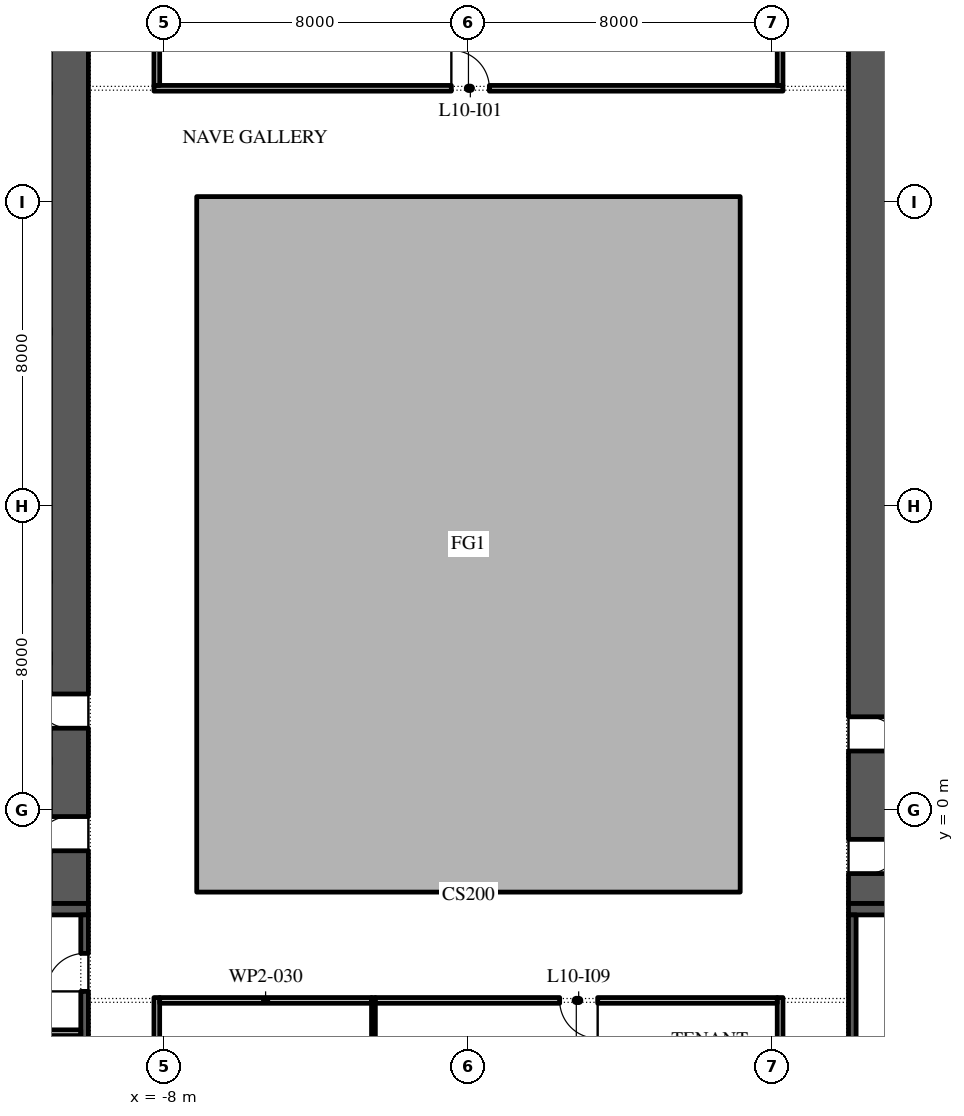
"""IFC4 building model, lengths in metres.
Left out: names, types, materials, properties, quantities, classifications, styles, units other than length and angle.
Written with IfcOpenShell. Run it as: python <this file> out.ifc"""

import sys

from ifc_helpers import new_model, si_unit, direction, frame, frame_2d, origin, place, context, subcontext, project, spatial, polyline, rectangle, outline, extrude, element, fill, save


model = new_model("IFC4")
c1 = context("Model", 3, precision=1e-05, world=origin(), true_north=direction((0.0, 1.0)))
c2 = subcontext(c1, "Body", "Model", "MODEL_VIEW")
j1 = project(units=[si_unit("LENGTHUNIT", "METRE"), si_unit("PLANEANGLEUNIT", "RADIAN")], contexts=[c1])
p1 = place(None, origin())
s1 = spatial("IfcSite", under=j1, at=p1, CompositionType="ELEMENT")
p2 = place(p1, origin())
s2 = spatial("IfcBuilding", under=s1, at=p2, CompositionType="ELEMENT")
p3 = place(p2, frame((0.0, 0.0, 52.2)))
s3 = spatial("IfcBuildingStorey", under=s2, at=p3, CompositionType="ELEMENT", Elevation=52.2)
p4 = place(p3, origin())
e1 = element("IfcWall", 1, at=p4, inside=s3, PredefinedType="STANDARD", context=c2, shape_type="SweptSolid", body=[
    extrude(outline(polyline([(-7.15, -2.15), (7.15, -2.15), (7.15, 16.15), (-7.15, 16.15), (-7.15, -2.15)]), holes=[polyline([(-7.0, -2.0), (-7.0, 16.0), (7.0, 16.0), (7.0, -2.0), (-7.0, -2.0)])]), origin(), (0.0, 0.0, 1.0), 4.0),
])
p5 = place(p3, frame((-10.5, -2.45, 0.0), z_axis=(0.0, 0.0, 1.0), x_axis=(0.0, 1.0, 0.0)))
e2 = element("IfcWall", 2, at=p5, inside=s3, PredefinedType="SHEAR", context=c2, shape_type="SweptSolid", body=[
    extrude(rectangle(XDim=27.9, YDim=1.0, at=frame_2d((13.95, 0.0))), origin(), (0.0, 0.0, 1.0), 4.0),
])
p6 = place(p5, frame((23.65, 0.0, 0.0)))
e3 = element("IfcOpeningElement", 3, at=p6, cuts=e2, PredefinedType="OPENING", context=c2, shape_type="SweptSolid", body=[
    extrude(rectangle(XDim=2.4, YDim=2.1, at=frame_2d((1.2, 1.05))), frame((0.0, 0.51, 0.0), z_axis=(0.0, -1.0, 0.0), x_axis=(1.0, 0.0, 0.0)), (0.0, 0.0, 1.0), 1.02),
])
p7 = place(p5, frame((1.387, 0.0, 0.0)))
e4 = element("IfcOpeningElement", 4, at=p7, cuts=e2, PredefinedType="OPENING", context=c2, shape_type="SweptSolid", body=[
    extrude(rectangle(XDim=0.9, YDim=2.1, at=frame_2d((0.45, 1.05))), frame((0.0, 0.51, 0.0), z_axis=(0.0, -1.0, 0.0), x_axis=(1.0, 0.0, 0.0)), (0.0, 0.0, 1.0), 1.02),
])
p8 = place(p5, frame((4.613, 0.0, 0.0)))
e5 = element("IfcOpeningElement", 5, at=p8, cuts=e2, PredefinedType="OPENING", context=c2, shape_type="SweptSolid", body=[
    extrude(rectangle(XDim=0.9, YDim=2.1, at=frame_2d((0.45, 1.05))), frame((0.0, 0.51, 0.0), z_axis=(0.0, -1.0, 0.0), x_axis=(1.0, 0.0, 0.0)), (0.0, 0.0, 1.0), 1.02),
])
p9 = place(p3, frame((-22.0, -2.6, 0.0), z_axis=(0.0, 0.0, 1.0), x_axis=(1.0, 0.0, 0.0)))
e6 = element("IfcWall", 6, at=p9, inside=s3, PredefinedType="SHEAR", context=c2, shape_type="SweptSolid", body=[
    extrude(rectangle(XDim=12.0, YDim=0.3, at=frame_2d((6.0, 0.0))), origin(), (0.0, 0.0, 1.0), 4.0),
])
p10 = place(p3, frame((-10.1, -15.8, 0.0), z_axis=(0.0, 0.0, 1.0), x_axis=(0.0, 1.0, 0.0)))
e7 = element("IfcWall", 7, at=p10, inside=s3, PredefinedType="SHEAR", context=c2, shape_type="SweptSolid", body=[
    extrude(rectangle(XDim=13.05, YDim=0.2, at=frame_2d((6.525, 0.0))), origin(), (0.0, 0.0, 1.0), 4.0),
])
p11 = place(p10, frame((4.488, 0.0, 0.0)))
e8 = element("IfcOpeningElement", 8, at=p11, cuts=e7, PredefinedType="OPENING", context=c2, shape_type="SweptSolid", body=[
    extrude(rectangle(XDim=0.9, YDim=2.1, at=frame_2d((0.45, 1.05))), frame((0.0, 0.11, 0.0), z_axis=(0.0, -1.0, 0.0), x_axis=(1.0, 0.0, 0.0)), (0.0, 0.0, 1.0), 0.22),
])
p12 = place(p10, frame((11.038, 0.0, 0.0)))
e9 = element("IfcOpeningElement", 9, at=p12, cuts=e7, PredefinedType="OPENING", context=c2, shape_type="SweptSolid", body=[
    extrude(rectangle(XDim=1.0, YDim=2.1, at=frame_2d((0.5, 1.05))), frame((0.0, 0.11, 0.0), z_axis=(0.0, -1.0, 0.0), x_axis=(1.0, 0.0, 0.0)), (0.0, 0.0, 1.0), 0.22),
])
p13 = place(p3, frame((-21.8, -5.85, 0.0), z_axis=(0.0, 0.0, 1.0), x_axis=(1.0, 0.0, 0.0)))
e10 = element("IfcWall", 10, at=p13, inside=s3, PredefinedType="PARTITIONING", context=c2, shape_type="SweptSolid", body=[
    extrude(rectangle(XDim=11.6, YDim=0.15, at=frame_2d((5.8, 0.0))), origin(), (0.0, 0.0, 1.0), 4.0),
])
p14 = place(p3, frame((10.5, -2.45, 0.0), z_axis=(0.0, 0.0, 1.0), x_axis=(0.0, 1.0, 0.0)))
e11 = element("IfcWall", 11, at=p14, inside=s3, PredefinedType="SHEAR", context=c2, shape_type="SweptSolid", body=[
    extrude(rectangle(XDim=27.9, YDim=1.0, at=frame_2d((13.95, 0.0))), origin(), (0.0, 0.0, 1.0), 4.0),
])
p15 = place(p14, frame((23.65, 0.0, 0.0)))
e12 = element("IfcOpeningElement", 12, at=p15, cuts=e11, PredefinedType="OPENING", context=c2, shape_type="SweptSolid", body=[
    extrude(rectangle(XDim=2.4, YDim=2.1, at=frame_2d((1.2, 1.05))), frame((0.0, 0.51, 0.0), z_axis=(0.0, -1.0, 0.0), x_axis=(1.0, 0.0, 0.0)), (0.0, 0.0, 1.0), 1.02),
])
p16 = place(p14, frame((0.788, 0.0, 0.0)))
e13 = element("IfcOpeningElement", 13, at=p16, cuts=e11, PredefinedType="OPENING", context=c2, shape_type="SweptSolid", body=[
    extrude(rectangle(XDim=0.9, YDim=2.1, at=frame_2d((0.45, 1.05))), frame((0.0, 0.51, 0.0), z_axis=(0.0, -1.0, 0.0), x_axis=(1.0, 0.0, 0.0)), (0.0, 0.0, 1.0), 1.02),
])
p17 = place(p14, frame((4.012, 0.0, 0.0)))
e14 = element("IfcOpeningElement", 14, at=p17, cuts=e11, PredefinedType="OPENING", context=c2, shape_type="SweptSolid", body=[
    extrude(rectangle(XDim=0.9, YDim=2.1, at=frame_2d((0.45, 1.05))), frame((0.0, 0.51, 0.0), z_axis=(0.0, -1.0, 0.0), x_axis=(1.0, 0.0, 0.0)), (0.0, 0.0, 1.0), 1.02),
])
p18 = place(p3, frame((10.0, -2.6, 0.0), z_axis=(0.0, 0.0, 1.0), x_axis=(1.0, 0.0, 0.0)))
e15 = element("IfcWall", 15, at=p18, inside=s3, PredefinedType="SHEAR", context=c2, shape_type="SweptSolid", body=[
    extrude(rectangle(XDim=12.0, YDim=0.3, at=frame_2d((6.0, 0.0))), origin(), (0.0, 0.0, 1.0), 4.0),
])
p19 = place(p3, frame((10.1, -15.8, 0.0), z_axis=(0.0, 0.0, 1.0), x_axis=(0.0, 1.0, 0.0)))
e16 = element("IfcWall", 16, at=p19, inside=s3, PredefinedType="SHEAR", context=c2, shape_type="SweptSolid", body=[
    extrude(rectangle(XDim=13.05, YDim=0.2, at=frame_2d((6.525, 0.0))), origin(), (0.0, 0.0, 1.0), 4.0),
])
p20 = place(p19, frame((6.075, 0.0, 0.0)))
e17 = element("IfcOpeningElement", 17, at=p20, cuts=e16, PredefinedType="OPENING", context=c2, shape_type="SweptSolid", body=[
    extrude(rectangle(XDim=0.9, YDim=2.1, at=frame_2d((0.45, 1.05))), frame((0.0, 0.11, 0.0), z_axis=(0.0, -1.0, 0.0), x_axis=(1.0, 0.0, 0.0)), (0.0, 0.0, 1.0), 0.22),
])
p21 = place(p3, frame((-8.2, -4.925, 0.0), z_axis=(0.0, 0.0, 1.0), x_axis=(0.0, -1.0, 0.0)))
e18 = element("IfcWall", 18, at=p21, inside=s3, PredefinedType="PARTITIONING", context=c2, shape_type="SweptSolid", body=[
    extrude(rectangle(XDim=12.415, YDim=0.15, at=frame_2d((6.208, 0.0))), origin(), (0.0, 0.0, 1.0), 4.0),
])
p22 = place(p21, frame((5.715, 0.0, 0.0)))
e19 = element("IfcOpeningElement", 19, at=p22, cuts=e18, PredefinedType="OPENING", context=c2, shape_type="SweptSolid", body=[
    extrude(rectangle(XDim=1.0, YDim=2.1, at=frame_2d((0.5, 1.05))), frame((0.0, 0.085, 0.0), z_axis=(0.0, -1.0, 0.0), x_axis=(1.0, 0.0, 0.0)), (0.0, 0.0, 1.0), 0.17),
])
p23 = place(p3, frame((-8.275, 19.0, 0.0), z_axis=(0.0, 0.0, 1.0), x_axis=(1.0, 0.0, 0.0)))
e20 = element("IfcWall", 20, at=p23, inside=s3, PredefinedType="PARTITIONING", context=c2, shape_type="SweptSolid", body=[
    extrude(rectangle(XDim=16.55, YDim=0.15, at=frame_2d((8.275, 0.0))), origin(), (0.0, 0.0, 1.0), 4.0),
])
p24 = place(p23, frame((7.825, 0.0, 0.0)))
e21 = element("IfcOpeningElement", 21, at=p24, cuts=e20, PredefinedType="OPENING", context=c2, shape_type="SweptSolid", body=[
    extrude(rectangle(XDim=1.0, YDim=2.1, at=frame_2d((0.5, 1.05))), frame((0.0, 0.085, 0.0), z_axis=(0.0, -1.0, 0.0), x_axis=(1.0, 0.0, 0.0)), (0.0, 0.0, 1.0), 0.17),
])
p25 = place(p3, frame((-8.2, 25.45, 0.0), z_axis=(0.0, 0.0, 1.0), x_axis=(0.0, -1.0, 0.0)))
e22 = element("IfcWall", 22, at=p25, inside=s3, PredefinedType="PARTITIONING", context=c2, shape_type="SweptSolid", body=[
    extrude(rectangle(XDim=6.375, YDim=0.15, at=frame_2d((3.188, 0.0))), origin(), (0.0, 0.0, 1.0), 4.0),
])
p26 = place(p3, frame((-2.5, -8.45, 0.0), z_axis=(0.0, 0.0, 1.0), x_axis=(0.0, 1.0, 0.0)))
e23 = element("IfcWall", 23, at=p26, inside=s3, PredefinedType="PARTITIONING", context=c2, shape_type="SweptSolid", body=[
    extrude(rectangle(XDim=3.525, YDim=0.1, at=frame_2d((1.762, 0.0))), origin(), (0.0, 0.0, 1.0), 4.0),
])
p27 = place(p3, frame((-2.55, -5.0, 0.0), z_axis=(0.0, 0.0, 1.0), x_axis=(-1.0, 0.0, 0.0)))
e24 = element("IfcWall", 24, at=p27, inside=s3, PredefinedType="PARTITIONING", context=c2, shape_type="SweptSolid", body=[
    extrude(rectangle(XDim=5.575, YDim=0.15, at=frame_2d((2.788, 0.0))), origin(), (0.0, 0.0, 1.0), 4.0),
])
p28 = place(p3, frame((8.2, -8.45, 0.0), z_axis=(0.0, 0.0, 1.0), x_axis=(0.0, 1.0, 0.0)))
e25 = element("IfcWall", 25, at=p28, inside=s3, PredefinedType="PARTITIONING", context=c2, shape_type="SweptSolid", body=[
    extrude(rectangle(XDim=3.525, YDim=0.15, at=frame_2d((1.762, 0.0))), origin(), (0.0, 0.0, 1.0), 4.0),
])
p29 = place(p3, frame((8.125, -5.0, 0.0), z_axis=(0.0, 0.0, 1.0), x_axis=(-1.0, 0.0, 0.0)))
e26 = element("IfcWall", 26, at=p29, inside=s3, PredefinedType="PARTITIONING", context=c2, shape_type="SweptSolid", body=[
    extrude(rectangle(XDim=10.575, YDim=0.15, at=frame_2d((5.288, 0.0))), origin(), (0.0, 0.0, 1.0), 4.0),
])
p30 = place(p29, frame((4.725, 0.0, 0.0)))
e27 = element("IfcOpeningElement", 27, at=p30, cuts=e26, PredefinedType="OPENING", context=c2, shape_type="SweptSolid", body=[
    extrude(rectangle(XDim=1.0, YDim=2.1, at=frame_2d((0.5, 1.05))), frame((0.0, 0.085, 0.0), z_axis=(0.0, -1.0, 0.0), x_axis=(1.0, 0.0, 0.0)), (0.0, 0.0, 1.0), 0.17),
])
p31 = place(p3, frame((8.2, 19.075, 0.0), z_axis=(0.0, 0.0, 1.0), x_axis=(0.0, 1.0, 0.0)))
e28 = element("IfcWall", 28, at=p31, inside=s3, PredefinedType="PARTITIONING", context=c2, shape_type="SweptSolid", body=[
    extrude(rectangle(XDim=6.275, YDim=0.15, at=frame_2d((3.138, 0.0))), origin(), (0.0, 0.0, 1.0), 4.0),
])
p32 = place(p12, origin())
e29 = element("IfcDoor", 29, at=p32, inside=s3, OperationType="SINGLE_SWING_RIGHT", PredefinedType="DOOR", context=c2, shape_type="SweptSolid", body=[
    extrude(rectangle(XDim=1.0, YDim=2.1, at=frame_2d((0.5, 1.05))), frame((0.0, 0.1, 0.0), z_axis=(0.0, -1.0, 0.0), x_axis=(1.0, 0.0, 0.0)), (0.0, 0.0, 1.0), 0.05),
])
fill(e9, e29)
p33 = place(p24, origin())
e30 = element("IfcDoor", 30, at=p33, inside=s3, OperationType="SINGLE_SWING_RIGHT", PredefinedType="DOOR", context=c2, shape_type="SweptSolid", body=[
    extrude(rectangle(XDim=1.0, YDim=2.1, at=frame_2d((0.5, 1.05))), frame((0.0, 0.025, 0.0), z_axis=(0.0, -1.0, 0.0), x_axis=(1.0, 0.0, 0.0)), (0.0, 0.0, 1.0), 0.05),
])
fill(e21, e30)
p34 = place(p30, origin())
e31 = element("IfcDoor", 31, at=p34, inside=s3, OperationType="SINGLE_SWING_RIGHT", PredefinedType="DOOR", context=c2, shape_type="SweptSolid", body=[
    extrude(rectangle(XDim=1.0, YDim=2.1, at=frame_2d((0.5, 1.05))), frame((0.0, 0.025, 0.0), z_axis=(0.0, -1.0, 0.0), x_axis=(1.0, 0.0, 0.0)), (0.0, 0.0, 1.0), 0.05),
])
fill(e27, e31)
save(model, sys.argv[1])
